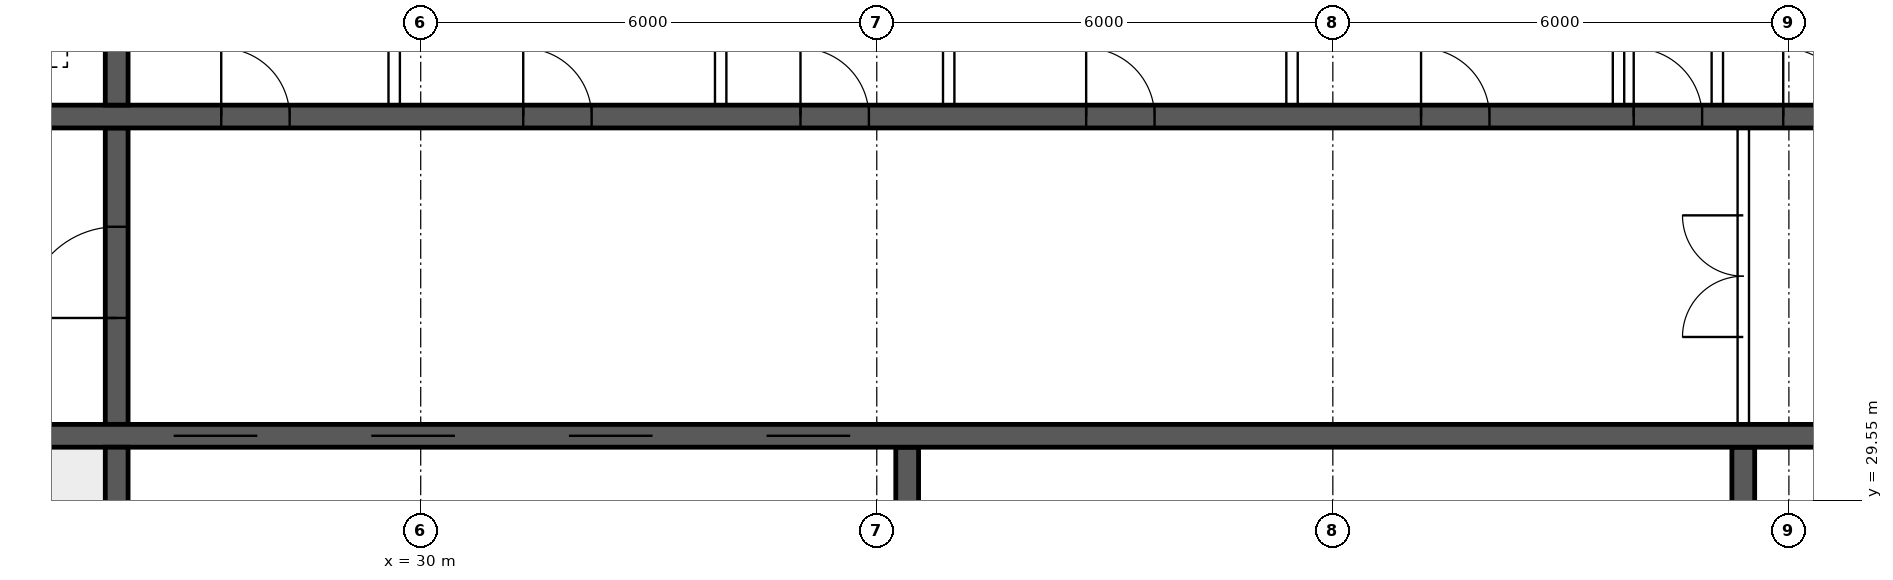
"""IFC4 building model, lengths in metres.
Left out: names, types, materials, properties, quantities, classifications, styles, units other than length and angle.
Written with IfcOpenShell. Run it as: python <this file> out.ifc"""

import sys

from ifc_helpers import new_model, si_unit, direction, frame, frame_2d, origin, place, context, subcontext, project, spatial, rectangle, extrude, element, fill, save


model = new_model("IFC4")
c1 = context("Model", 3, precision=1e-05, world=origin(), true_north=direction((0.0, 1.0)))
c2 = subcontext(c1, "Body", "Model", "MODEL_VIEW")
j1 = project(units=[si_unit("LENGTHUNIT", "METRE"), si_unit("PLANEANGLEUNIT", "RADIAN")], contexts=[c1])
p1 = place(None, origin())
s1 = spatial("IfcSite", under=j1, at=p1, CompositionType="ELEMENT")
p2 = place(p1, origin())
s2 = spatial("IfcBuilding", under=s1, at=p2, CompositionType="ELEMENT")
p3 = place(p2, frame((0.0, 0.0, 27.7)))
s3 = spatial("IfcBuildingStorey", under=s2, at=p3, CompositionType="ELEMENT", Elevation=27.7)
p4 = place(p3, frame((18.5, 30.4, 0.0), z_axis=(0.0, 0.0, 1.0), x_axis=(1.0, 0.0, 0.0)))
e1 = element("IfcWall", 1, at=p4, inside=s3, PredefinedType="SHEAR", context=c2, shape_type="SweptSolid", body=[
    extrude(rectangle(XDim=47.0, YDim=0.3, at=frame_2d((23.5, 0.0))), origin(), (0.0, 0.0, 1.0), 3.75),
])
p5 = place(p4, frame((0.4, 0.0, 0.0)))
e2 = element("IfcOpeningElement", 2, at=p5, cuts=e1, PredefinedType="OPENING", context=c2, shape_type="SweptSolid", body=[
    extrude(rectangle(XDim=1.0, YDim=2.1, at=frame_2d((0.5, 1.05))), frame((0.0, 0.16, 0.0), z_axis=(0.0, -1.0, 0.0), x_axis=(1.0, 0.0, 0.0)), (0.0, 0.0, 1.0), 0.32),
])
p6 = place(p4, frame((45.6, 0.0, 0.0)))
e3 = element("IfcOpeningElement", 3, at=p6, cuts=e1, PredefinedType="OPENING", context=c2, shape_type="SweptSolid", body=[
    extrude(rectangle(XDim=1.0, YDim=2.1, at=frame_2d((0.5, 1.05))), frame((0.0, 0.16, 0.0), z_axis=(0.0, -1.0, 0.0), x_axis=(1.0, 0.0, 0.0)), (0.0, 0.0, 1.0), 0.32),
])
p7 = place(p4, frame((8.25, 0.0, 0.0)))
e4 = element("IfcOpeningElement", 4, at=p7, cuts=e1, PredefinedType="OPENING", context=c2, shape_type="SweptSolid", body=[
    extrude(rectangle(XDim=1.1, YDim=2.1, at=frame_2d((0.55, 1.05))), frame((0.0, 0.16, 0.0), z_axis=(0.0, -1.0, 0.0), x_axis=(1.0, 0.0, 0.0)), (0.0, 0.0, 1.0), 0.32),
])
p8 = place(p4, frame((10.85, 0.0, 0.0)))
e5 = element("IfcOpeningElement", 5, at=p8, cuts=e1, PredefinedType="OPENING", context=c2, shape_type="SweptSolid", body=[
    extrude(rectangle(XDim=1.1, YDim=2.1, at=frame_2d((0.55, 1.05))), frame((0.0, 0.16, 0.0), z_axis=(0.0, -1.0, 0.0), x_axis=(1.0, 0.0, 0.0)), (0.0, 0.0, 1.0), 0.32),
])
p9 = place(p4, frame((13.45, 0.0, 0.0)))
e6 = element("IfcOpeningElement", 6, at=p9, cuts=e1, PredefinedType="OPENING", context=c2, shape_type="SweptSolid", body=[
    extrude(rectangle(XDim=1.1, YDim=2.1, at=frame_2d((0.55, 1.05))), frame((0.0, 0.16, 0.0), z_axis=(0.0, -1.0, 0.0), x_axis=(1.0, 0.0, 0.0)), (0.0, 0.0, 1.0), 0.32),
])
p10 = place(p4, frame((16.05, 0.0, 0.0)))
e7 = element("IfcOpeningElement", 7, at=p10, cuts=e1, PredefinedType="OPENING", context=c2, shape_type="SweptSolid", body=[
    extrude(rectangle(XDim=1.1, YDim=2.1, at=frame_2d((0.55, 1.05))), frame((0.0, 0.16, 0.0), z_axis=(0.0, -1.0, 0.0), x_axis=(1.0, 0.0, 0.0)), (0.0, 0.0, 1.0), 0.32),
])
p11 = place(p4, frame((30.117, 0.0, 0.0)))
e8 = element("IfcOpeningElement", 8, at=p11, cuts=e1, PredefinedType="OPENING", context=c2, shape_type="SweptSolid", body=[
    extrude(rectangle(XDim=1.1, YDim=2.1, at=frame_2d((0.55, 1.05))), frame((0.0, 0.16, 0.0), z_axis=(0.0, -1.0, 0.0), x_axis=(1.0, 0.0, 0.0)), (0.0, 0.0, 1.0), 0.32),
])
p12 = place(p4, frame((33.65, 0.0, 0.0)))
e9 = element("IfcOpeningElement", 9, at=p12, cuts=e1, PredefinedType="OPENING", context=c2, shape_type="SweptSolid", body=[
    extrude(rectangle(XDim=1.1, YDim=2.1, at=frame_2d((0.55, 1.05))), frame((0.0, 0.16, 0.0), z_axis=(0.0, -1.0, 0.0), x_axis=(1.0, 0.0, 0.0)), (0.0, 0.0, 1.0), 0.32),
])
p13 = place(p4, frame((37.183, 0.0, 0.0)))
e10 = element("IfcOpeningElement", 10, at=p13, cuts=e1, PredefinedType="OPENING", context=c2, shape_type="SweptSolid", body=[
    extrude(rectangle(XDim=1.1, YDim=2.1, at=frame_2d((0.55, 1.05))), frame((0.0, 0.16, 0.0), z_axis=(0.0, -1.0, 0.0), x_axis=(1.0, 0.0, 0.0)), (0.0, 0.0, 1.0), 0.32),
])
p14 = place(p3, frame((18.5, 34.6, 0.0), z_axis=(0.0, 0.0, 1.0), x_axis=(1.0, 0.0, 0.0)))
e11 = element("IfcWall", 11, at=p14, inside=s3, PredefinedType="SHEAR", context=c2, shape_type="SweptSolid", body=[
    extrude(rectangle(XDim=47.0, YDim=0.3, at=frame_2d((23.5, 0.0))), origin(), (0.0, 0.0, 1.0), 3.75),
])
p15 = place(p14, frame((0.9, 0.0, 0.0)))
e12 = element("IfcOpeningElement", 12, at=p15, cuts=e11, PredefinedType="OPENING", context=c2, shape_type="SweptSolid", body=[
    extrude(rectangle(XDim=1.1, YDim=2.1, at=frame_2d((0.55, 1.05))), frame((0.0, 0.16, 0.0), z_axis=(0.0, -1.0, 0.0), x_axis=(1.0, 0.0, 0.0)), (0.0, 0.0, 1.0), 0.32),
])
p16 = place(p14, frame((45.0, 0.0, 0.0)))
e13 = element("IfcOpeningElement", 13, at=p16, cuts=e11, PredefinedType="OPENING", context=c2, shape_type="SweptSolid", body=[
    extrude(rectangle(XDim=1.1, YDim=2.1, at=frame_2d((0.55, 1.05))), frame((0.0, 0.16, 0.0), z_axis=(0.0, -1.0, 0.0), x_axis=(1.0, 0.0, 0.0)), (0.0, 0.0, 1.0), 0.32),
])
p17 = place(p14, frame((4.1, 0.0, 0.0)))
e14 = element("IfcOpeningElement", 14, at=p17, cuts=e11, PredefinedType="OPENING", context=c2, shape_type="SweptSolid", body=[
    extrude(rectangle(XDim=0.9, YDim=2.1, at=frame_2d((0.45, 1.05))), frame((0.0, 0.16, 0.0), z_axis=(0.0, -1.0, 0.0), x_axis=(1.0, 0.0, 0.0)), (0.0, 0.0, 1.0), 0.32),
])
p18 = place(p14, frame((42.0, 0.0, 0.0)))
e15 = element("IfcOpeningElement", 15, at=p18, cuts=e11, PredefinedType="OPENING", context=c2, shape_type="SweptSolid", body=[
    extrude(rectangle(XDim=0.9, YDim=2.1, at=frame_2d((0.45, 1.05))), frame((0.0, 0.16, 0.0), z_axis=(0.0, -1.0, 0.0), x_axis=(1.0, 0.0, 0.0)), (0.0, 0.0, 1.0), 0.32),
])
p19 = place(p14, frame((8.875, 0.0, 0.0)))
e16 = element("IfcOpeningElement", 16, at=p19, cuts=e11, PredefinedType="OPENING", context=c2, shape_type="SweptSolid", body=[
    extrude(rectangle(XDim=0.9, YDim=2.1, at=frame_2d((0.45, 1.05))), frame((0.0, 0.16, 0.0), z_axis=(0.0, -1.0, 0.0), x_axis=(1.0, 0.0, 0.0)), (0.0, 0.0, 1.0), 0.32),
])
p20 = place(p14, frame((12.849, 0.0, 0.0)))
e17 = element("IfcOpeningElement", 17, at=p20, cuts=e11, PredefinedType="OPENING", context=c2, shape_type="SweptSolid", body=[
    extrude(rectangle(XDim=0.9, YDim=2.1, at=frame_2d((0.45, 1.05))), frame((0.0, 0.16, 0.0), z_axis=(0.0, -1.0, 0.0), x_axis=(1.0, 0.0, 0.0)), (0.0, 0.0, 1.0), 0.32),
])
p21 = place(p14, frame((16.496, 0.0, 0.0)))
e18 = element("IfcOpeningElement", 18, at=p21, cuts=e11, PredefinedType="OPENING", context=c2, shape_type="SweptSolid", body=[
    extrude(rectangle(XDim=0.9, YDim=2.1, at=frame_2d((0.45, 1.05))), frame((0.0, 0.16, 0.0), z_axis=(0.0, -1.0, 0.0), x_axis=(1.0, 0.0, 0.0)), (0.0, 0.0, 1.0), 0.32),
])
p22 = place(p14, frame((20.255, 0.0, 0.0)))
e19 = element("IfcOpeningElement", 19, at=p22, cuts=e11, PredefinedType="OPENING", context=c2, shape_type="SweptSolid", body=[
    extrude(rectangle(XDim=0.9, YDim=2.1, at=frame_2d((0.45, 1.05))), frame((0.0, 0.16, 0.0), z_axis=(0.0, -1.0, 0.0), x_axis=(1.0, 0.0, 0.0)), (0.0, 0.0, 1.0), 0.32),
])
p23 = place(p14, frame((24.661, 0.0, 0.0)))
e20 = element("IfcOpeningElement", 20, at=p23, cuts=e11, PredefinedType="OPENING", context=c2, shape_type="SweptSolid", body=[
    extrude(rectangle(XDim=0.9, YDim=2.1, at=frame_2d((0.45, 1.05))), frame((0.0, 0.16, 0.0), z_axis=(0.0, -1.0, 0.0), x_axis=(1.0, 0.0, 0.0)), (0.0, 0.0, 1.0), 0.32),
])
p24 = place(p14, frame((27.458, 0.0, 0.0)))
e21 = element("IfcOpeningElement", 21, at=p24, cuts=e11, PredefinedType="OPENING", context=c2, shape_type="SweptSolid", body=[
    extrude(rectangle(XDim=0.9, YDim=2.1, at=frame_2d((0.45, 1.05))), frame((0.0, 0.16, 0.0), z_axis=(0.0, -1.0, 0.0), x_axis=(1.0, 0.0, 0.0)), (0.0, 0.0, 1.0), 0.32),
])
p25 = place(p14, frame((29.425, 0.0, 0.0)))
e22 = element("IfcOpeningElement", 22, at=p25, cuts=e11, PredefinedType="OPENING", context=c2, shape_type="SweptSolid", body=[
    extrude(rectangle(XDim=0.9, YDim=2.1, at=frame_2d((0.45, 1.05))), frame((0.0, 0.16, 0.0), z_axis=(0.0, -1.0, 0.0), x_axis=(1.0, 0.0, 0.0)), (0.0, 0.0, 1.0), 0.32),
])
p26 = place(p14, frame((31.857, 0.0, 0.0)))
e23 = element("IfcOpeningElement", 23, at=p26, cuts=e11, PredefinedType="OPENING", context=c2, shape_type="SweptSolid", body=[
    extrude(rectangle(XDim=0.9, YDim=2.1, at=frame_2d((0.45, 1.05))), frame((0.0, 0.16, 0.0), z_axis=(0.0, -1.0, 0.0), x_axis=(1.0, 0.0, 0.0)), (0.0, 0.0, 1.0), 0.32),
])
p27 = place(p14, frame((34.592, 0.0, 0.0)))
e24 = element("IfcOpeningElement", 24, at=p27, cuts=e11, PredefinedType="OPENING", context=c2, shape_type="SweptSolid", body=[
    extrude(rectangle(XDim=0.9, YDim=2.1, at=frame_2d((0.45, 1.05))), frame((0.0, 0.16, 0.0), z_axis=(0.0, -1.0, 0.0), x_axis=(1.0, 0.0, 0.0)), (0.0, 0.0, 1.0), 0.32),
])
p28 = place(p14, frame((37.632, 0.0, 0.0)))
e25 = element("IfcOpeningElement", 25, at=p28, cuts=e11, PredefinedType="OPENING", context=c2, shape_type="SweptSolid", body=[
    extrude(rectangle(XDim=0.9, YDim=2.1, at=frame_2d((0.45, 1.05))), frame((0.0, 0.16, 0.0), z_axis=(0.0, -1.0, 0.0), x_axis=(1.0, 0.0, 0.0)), (0.0, 0.0, 1.0), 0.32),
])
p29 = place(p3, frame((26.0, 26.3, 0.0), z_axis=(0.0, 0.0, 1.0), x_axis=(0.0, 1.0, 0.0)))
e26 = element("IfcWall", 26, at=p29, inside=s3, PredefinedType="SHEAR", context=c2, shape_type="SweptSolid", body=[
    extrude(rectangle(XDim=3.95, YDim=0.3, at=frame_2d((1.975, 0.0))), origin(), (0.0, 0.0, 1.0), 3.75),
])
p30 = place(p3, frame((26.0, 30.55, 0.0), z_axis=(0.0, 0.0, 1.0), x_axis=(0.0, 1.0, 0.0)))
e27 = element("IfcWall", 27, at=p30, inside=s3, PredefinedType="SHEAR", context=c2, shape_type="SweptSolid", body=[
    extrude(rectangle(XDim=3.9, YDim=0.3, at=frame_2d((1.95, 0.0))), origin(), (0.0, 0.0, 1.0), 3.75),
])
p31 = place(p30, frame((1.4, 0.0, 0.0)))
e28 = element("IfcOpeningElement", 28, at=p31, cuts=e27, PredefinedType="OPENING", context=c2, shape_type="SweptSolid", body=[
    extrude(rectangle(XDim=1.2, YDim=2.1, at=frame_2d((0.6, 1.05))), frame((0.0, 0.16, 0.0), z_axis=(0.0, -1.0, 0.0), x_axis=(1.0, 0.0, 0.0)), (0.0, 0.0, 1.0), 0.32),
])
p32 = place(p3, frame((26.0, 34.75, 0.0), z_axis=(0.0, 0.0, 1.0), x_axis=(0.0, 1.0, 0.0)))
e29 = element("IfcWall", 29, at=p32, inside=s3, PredefinedType="SHEAR", context=c2, shape_type="SweptSolid", body=[
    extrude(rectangle(XDim=2.95, YDim=0.3, at=frame_2d((1.475, 0.0))), origin(), (0.0, 0.0, 1.0), 3.75),
])
for number, where, z_axis, x_axis in (
    (30, (36.4, 26.3, 0.0), (0.0, 0.0, 1.0), (0.0, 1.0, 0.0)),
    (31, (47.4, 26.3, 0.0), (0.0, 0.0, 1.0), (0.0, 1.0, 0.0)),
):
    element("IfcWall", number, at=place(p3, frame(where, z_axis=z_axis, x_axis=x_axis)), inside=s3, PredefinedType="SHEAR", context=c2, shape_type="SweptSolid", body=[
        extrude(rectangle(XDim=3.95, YDim=0.3, at=frame_2d((1.975, 0.0))), origin(), (0.0, 0.0, 1.0), 3.75),
    ])
p33 = place(p3, frame((47.4, 30.55, 0.0), z_axis=(0.0, 0.0, 1.0), x_axis=(0.0, 1.0, 0.0)))
e32 = element("IfcWall", 32, at=p33, inside=s3, PredefinedType="SOLIDWALL", context=c2, shape_type="SweptSolid", body=[
    extrude(rectangle(XDim=3.9, YDim=0.15, at=frame_2d((1.95, 0.0))), origin(), (0.0, 0.0, 1.0), 3.5),
])
p34 = place(p33, frame((1.15, 0.0, 0.0)))
e33 = element("IfcOpeningElement", 33, at=p34, cuts=e32, PredefinedType="OPENING", context=c2, shape_type="SweptSolid", body=[
    extrude(rectangle(XDim=1.6, YDim=2.1, at=frame_2d((0.8, 1.05))), frame((0.0, 0.085, 0.0), z_axis=(0.0, -1.0, 0.0), x_axis=(1.0, 0.0, 0.0)), (0.0, 0.0, 1.0), 0.17),
])
for number, where, z_axis, x_axis in (
    (34, (29.651, 34.75, 0.0), (0.0, 0.0, 1.0), (0.0, 1.0, 0.0)),
    (35, (33.946, 34.75, 0.0), (0.0, 0.0, 1.0), (0.0, 1.0, 0.0)),
    (36, (36.946, 34.75, 0.0), (0.0, 0.0, 1.0), (0.0, 1.0, 0.0)),
    (37, (41.463, 34.75, 0.0), (0.0, 0.0, 1.0), (0.0, 1.0, 0.0)),
    (38, (45.758, 34.75, 0.0), (0.0, 0.0, 1.0), (0.0, 1.0, 0.0)),
    (39, (47.058, 34.75, 0.0), (0.0, 0.0, 1.0), (0.0, 1.0, 0.0)),
):
    element("IfcWall", number, at=place(p3, frame(where, z_axis=z_axis, x_axis=x_axis)), inside=s3, PredefinedType="SOLIDWALL", context=c2, shape_type="SweptSolid", body=[
        extrude(rectangle(XDim=2.95, YDim=0.15, at=frame_2d((1.475, 0.0))), origin(), (0.0, 0.0, 1.0), 3.5),
    ])
p35 = place(p34, origin())
e40 = element("IfcDoor", 40, at=p35, inside=s3, OperationType="DOUBLE_DOOR_SINGLE_SWING", PredefinedType="DOOR", context=c2, shape_type="SweptSolid", body=[
    extrude(rectangle(XDim=1.6, YDim=2.1, at=frame_2d((0.8, 1.05))), frame((0.0, 0.025, 0.0), z_axis=(0.0, -1.0, 0.0), x_axis=(1.0, 0.0, 0.0)), (0.0, 0.0, 1.0), 0.05),
])
fill(e33, e40)
p36 = place(p31, origin())
e41 = element("IfcDoor", 41, at=p36, inside=s3, OperationType="SINGLE_SWING_LEFT", PredefinedType="DOOR", context=c2, shape_type="SweptSolid", body=[
    extrude(rectangle(XDim=1.2, YDim=2.1, at=frame_2d((0.6, 1.05))), frame((0.0, 0.025, 0.0), z_axis=(0.0, -1.0, 0.0), x_axis=(1.0, 0.0, 0.0)), (0.0, 0.0, 1.0), 0.05),
])
fill(e28, e41)
p37 = place(p19, origin())
e42 = element("IfcDoor", 42, at=p37, inside=s3, OperationType="SINGLE_SWING_LEFT", PredefinedType="DOOR", context=c2, shape_type="SweptSolid", body=[
    extrude(rectangle(XDim=0.9, YDim=2.1, at=frame_2d((0.45, 1.05))), frame((0.0, 0.025, 0.0), z_axis=(0.0, -1.0, 0.0), x_axis=(1.0, 0.0, 0.0)), (0.0, 0.0, 1.0), 0.05),
])
fill(e16, e42)
p38 = place(p20, origin())
e43 = element("IfcDoor", 43, at=p38, inside=s3, OperationType="SINGLE_SWING_LEFT", PredefinedType="DOOR", context=c2, shape_type="SweptSolid", body=[
    extrude(rectangle(XDim=0.9, YDim=2.1, at=frame_2d((0.45, 1.05))), frame((0.0, 0.025, 0.0), z_axis=(0.0, -1.0, 0.0), x_axis=(1.0, 0.0, 0.0)), (0.0, 0.0, 1.0), 0.05),
])
fill(e17, e43)
p39 = place(p21, origin())
e44 = element("IfcDoor", 44, at=p39, inside=s3, OperationType="SINGLE_SWING_LEFT", PredefinedType="DOOR", context=c2, shape_type="SweptSolid", body=[
    extrude(rectangle(XDim=0.9, YDim=2.1, at=frame_2d((0.45, 1.05))), frame((0.0, 0.025, 0.0), z_axis=(0.0, -1.0, 0.0), x_axis=(1.0, 0.0, 0.0)), (0.0, 0.0, 1.0), 0.05),
])
fill(e18, e44)
p40 = place(p22, origin())
e45 = element("IfcDoor", 45, at=p40, inside=s3, OperationType="SINGLE_SWING_LEFT", PredefinedType="DOOR", context=c2, shape_type="SweptSolid", body=[
    extrude(rectangle(XDim=0.9, YDim=2.1, at=frame_2d((0.45, 1.05))), frame((0.0, 0.025, 0.0), z_axis=(0.0, -1.0, 0.0), x_axis=(1.0, 0.0, 0.0)), (0.0, 0.0, 1.0), 0.05),
])
fill(e19, e45)
p41 = place(p23, origin())
e46 = element("IfcDoor", 46, at=p41, inside=s3, OperationType="SINGLE_SWING_LEFT", PredefinedType="DOOR", context=c2, shape_type="SweptSolid", body=[
    extrude(rectangle(XDim=0.9, YDim=2.1, at=frame_2d((0.45, 1.05))), frame((0.0, 0.025, 0.0), z_axis=(0.0, -1.0, 0.0), x_axis=(1.0, 0.0, 0.0)), (0.0, 0.0, 1.0), 0.05),
])
fill(e20, e46)
p42 = place(p24, origin())
e47 = element("IfcDoor", 47, at=p42, inside=s3, OperationType="SINGLE_SWING_LEFT", PredefinedType="DOOR", context=c2, shape_type="SweptSolid", body=[
    extrude(rectangle(XDim=0.9, YDim=2.1, at=frame_2d((0.45, 1.05))), frame((0.0, 0.025, 0.0), z_axis=(0.0, -1.0, 0.0), x_axis=(1.0, 0.0, 0.0)), (0.0, 0.0, 1.0), 0.05),
])
fill(e21, e47)
p43 = place(p25, origin())
e48 = element("IfcDoor", 48, at=p43, inside=s3, OperationType="SINGLE_SWING_LEFT", PredefinedType="DOOR", context=c2, shape_type="SweptSolid", body=[
    extrude(rectangle(XDim=0.9, YDim=2.1, at=frame_2d((0.45, 1.05))), frame((0.0, 0.025, 0.0), z_axis=(0.0, -1.0, 0.0), x_axis=(1.0, 0.0, 0.0)), (0.0, 0.0, 1.0), 0.05),
])
fill(e22, e48)
p44 = place(p7, origin())
e49 = element("IfcDoor", 49, at=p44, inside=s3, OperationType="DOUBLE_DOOR_SLIDING", PredefinedType="DOOR", context=c2, shape_type="SweptSolid", body=[
    extrude(rectangle(XDim=1.1, YDim=2.1, at=frame_2d((0.55, 1.05))), frame((0.0, 0.025, 0.0), z_axis=(0.0, -1.0, 0.0), x_axis=(1.0, 0.0, 0.0)), (0.0, 0.0, 1.0), 0.05),
])
fill(e4, e49)
p45 = place(p8, origin())
e50 = element("IfcDoor", 50, at=p45, inside=s3, OperationType="DOUBLE_DOOR_SLIDING", PredefinedType="DOOR", context=c2, shape_type="SweptSolid", body=[
    extrude(rectangle(XDim=1.1, YDim=2.1, at=frame_2d((0.55, 1.05))), frame((0.0, 0.025, 0.0), z_axis=(0.0, -1.0, 0.0), x_axis=(1.0, 0.0, 0.0)), (0.0, 0.0, 1.0), 0.05),
])
fill(e5, e50)
p46 = place(p9, origin())
e51 = element("IfcDoor", 51, at=p46, inside=s3, OperationType="DOUBLE_DOOR_SLIDING", PredefinedType="DOOR", context=c2, shape_type="SweptSolid", body=[
    extrude(rectangle(XDim=1.1, YDim=2.1, at=frame_2d((0.55, 1.05))), frame((0.0, 0.025, 0.0), z_axis=(0.0, -1.0, 0.0), x_axis=(1.0, 0.0, 0.0)), (0.0, 0.0, 1.0), 0.05),
])
fill(e6, e51)
p47 = place(p10, origin())
e52 = element("IfcDoor", 52, at=p47, inside=s3, OperationType="DOUBLE_DOOR_SLIDING", PredefinedType="DOOR", context=c2, shape_type="SweptSolid", body=[
    extrude(rectangle(XDim=1.1, YDim=2.1, at=frame_2d((0.55, 1.05))), frame((0.0, 0.025, 0.0), z_axis=(0.0, -1.0, 0.0), x_axis=(1.0, 0.0, 0.0)), (0.0, 0.0, 1.0), 0.05),
])
fill(e7, e52)
save(model, sys.argv[1])
